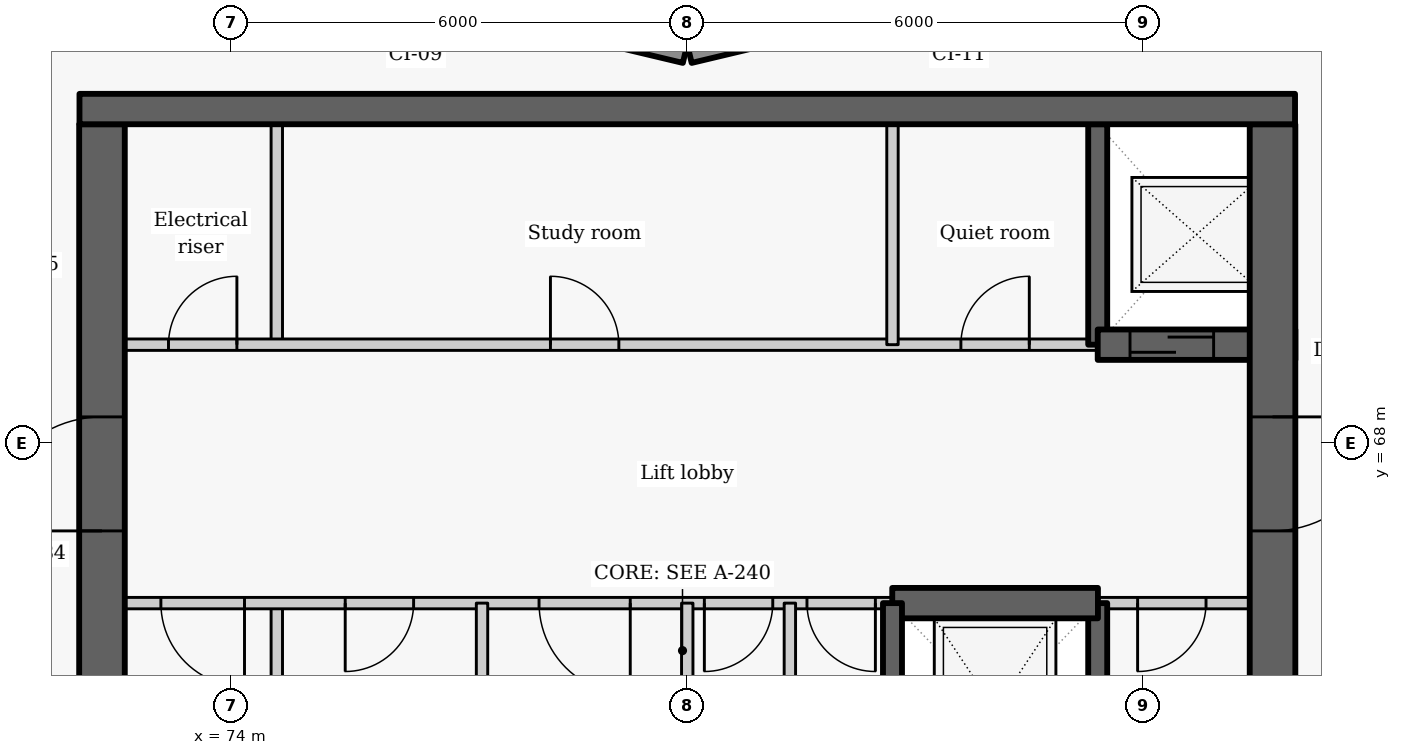
"""IFC4 building model, lengths in metres.
Left out: names, types, materials, properties, quantities, classifications, styles, units other than length and angle.
Written with IfcOpenShell. Run it as: python <this file> out.ifc"""

import sys

from ifc_helpers import new_model, si_unit, direction, frame, frame_2d, origin, place, context, subcontext, project, spatial, rectangle, extrude, element, fill, save


model = new_model("IFC4")
c1 = context("Model", 3, precision=1e-05, world=origin(), true_north=direction((0.0, 1.0)))
c2 = subcontext(c1, "Body", "Model", "MODEL_VIEW")
j1 = project(units=[si_unit("LENGTHUNIT", "METRE"), si_unit("PLANEANGLEUNIT", "RADIAN")], contexts=[c1])
p1 = place(None, origin())
s1 = spatial("IfcSite", under=j1, at=p1, CompositionType="ELEMENT")
p2 = place(p1, origin())
s2 = spatial("IfcBuilding", under=s1, at=p2, CompositionType="ELEMENT")
p3 = place(p2, frame((0.0, 0.0, 229.5)))
s3 = spatial("IfcBuildingStorey", under=s2, at=p3, CompositionType="ELEMENT", Elevation=229.5)
for number, where, z_axis, x_axis in (
    (1, (83.186, 73.881, 0.0), (0.0, 0.0, 1.0), (-0.973, -0.232, 0.0)),
    (2, (79.971, 73.128, 0.0), (0.0, 0.0, 1.0), (-0.973, 0.232, 0.0)),
):
    element("IfcWall", number, at=place(p3, frame(where, z_axis=z_axis, x_axis=x_axis)), inside=s3, PredefinedType="SOLIDWALL", context=c2, shape_type="SweptSolid", body=[
        extrude(rectangle(XDim=3.246, YDim=0.25, at=frame_2d((1.623, 0.0))), origin(), (0.0, 0.0, 1.0), 2.425),
    ])
p4 = place(p3, frame((74.6, 63.1, 0.0), z_axis=(0.0, 0.0, 1.0), x_axis=(0.0, 1.0, 0.0)))
e3 = element("IfcWall", 3, at=p4, inside=s3, PredefinedType="PARTITIONING", context=c2, shape_type="SweptSolid", body=[
    extrude(rectangle(XDim=2.8, YDim=0.15, at=frame_2d((1.4, 0.0))), origin(), (0.0, 0.0, 1.0), 3.025),
])
p5 = place(p3, frame((74.6, 69.3, 0.0), z_axis=(0.0, 0.0, 1.0), x_axis=(0.0, 1.0, 0.0)))
e4 = element("IfcWall", 4, at=p5, inside=s3, PredefinedType="PARTITIONING", context=c2, shape_type="SweptSolid", body=[
    extrude(rectangle(XDim=2.9, YDim=0.15, at=frame_2d((1.45, 0.0))), origin(), (0.0, 0.0, 1.0), 3.025),
])
p6 = place(p3, frame((72.0, 69.3, 0.0), z_axis=(0.0, 0.0, 1.0), x_axis=(1.0, 0.0, 0.0)))
e5 = element("IfcWall", 5, at=p6, inside=s3, PredefinedType="PARTITIONING", context=c2, shape_type="SweptSolid", body=[
    extrude(rectangle(XDim=13.4, YDim=0.15, at=frame_2d((6.7, 0.0))), origin(), (0.0, 0.0, 1.0), 3.025),
])
p7 = place(p6, frame((1.175, 0.0, 0.0)))
e6 = element("IfcOpeningElement", 6, at=p7, cuts=e5, PredefinedType="OPENING", context=c2, shape_type="SweptSolid", body=[
    extrude(rectangle(XDim=0.9, YDim=2.1, at=frame_2d((0.45, 1.05))), frame((0.0, 0.085, 0.0), z_axis=(0.0, -1.0, 0.0), x_axis=(1.0, 0.0, 0.0)), (0.0, 0.0, 1.0), 0.17),
])
p8 = place(p6, frame((6.2, 0.0, 0.0)))
e7 = element("IfcOpeningElement", 7, at=p8, cuts=e5, PredefinedType="OPENING", context=c2, shape_type="SweptSolid", body=[
    extrude(rectangle(XDim=0.9, YDim=2.1, at=frame_2d((0.45, 1.05))), frame((0.0, 0.085, 0.0), z_axis=(0.0, -1.0, 0.0), x_axis=(1.0, 0.0, 0.0)), (0.0, 0.0, 1.0), 0.17),
])
p9 = place(p6, frame((11.6, 0.0, 0.0)))
e8 = element("IfcOpeningElement", 8, at=p9, cuts=e5, PredefinedType="OPENING", context=c2, shape_type="SweptSolid", body=[
    extrude(rectangle(XDim=0.9, YDim=2.1, at=frame_2d((0.45, 1.05))), frame((0.0, 0.085, 0.0), z_axis=(0.0, -1.0, 0.0), x_axis=(1.0, 0.0, 0.0)), (0.0, 0.0, 1.0), 0.17),
])
p10 = place(p3, frame((72.3, 63.1, -0.275), z_axis=(0.0, 0.0, 1.0), x_axis=(0.0, 1.0, 0.0)))
e9 = element("IfcWall", 9, at=p10, inside=s3, PredefinedType="SHEAR", context=c2, shape_type="SweptSolid", body=[
    extrude(rectangle(XDim=9.1, YDim=0.6, at=frame_2d((4.55, 0.0))), origin(), (0.0, 0.0, 1.0), 3.3),
])
p11 = place(p10, frame((3.75, 0.0, 0.275)))
e10 = element("IfcOpeningElement", 10, at=p11, cuts=e9, PredefinedType="OPENING", context=c2, shape_type="SweptSolid", body=[
    extrude(rectangle(XDim=1.5, YDim=2.1, at=frame_2d((0.75, 1.05))), frame((0.0, 0.31, 0.0), z_axis=(0.0, -1.0, 0.0), x_axis=(1.0, 0.0, 0.0)), (0.0, 0.0, 1.0), 0.62),
])
p12 = place(p3, frame((85.4, 63.1, -0.275), z_axis=(0.0, 0.0, 1.0), x_axis=(0.0, 1.0, 0.0)))
e11 = element("IfcWall", 11, at=p12, inside=s3, PredefinedType="SHEAR", context=c2, shape_type="SweptSolid", body=[
    extrude(rectangle(XDim=2.8, YDim=0.25, at=frame_2d((1.4, 0.0))), origin(), (0.0, 0.0, 1.0), 3.3),
])
p13 = place(p3, frame((85.4, 69.3, -0.275), z_axis=(0.0, 0.0, 1.0), x_axis=(0.0, 1.0, 0.0)))
e12 = element("IfcWall", 12, at=p13, inside=s3, PredefinedType="SHEAR", context=c2, shape_type="SweptSolid", body=[
    extrude(rectangle(XDim=2.9, YDim=0.25, at=frame_2d((1.45, 0.0))), origin(), (0.0, 0.0, 1.0), 3.3),
])
p14 = place(p3, frame((85.4, 69.3, -0.275), z_axis=(0.0, 0.0, 1.0), x_axis=(1.0, 0.0, 0.0)))
e13 = element("IfcWall", 13, at=p14, inside=s3, PredefinedType="SHEAR", context=c2, shape_type="SweptSolid", body=[
    extrude(rectangle(XDim=2.6, YDim=0.4, at=frame_2d((1.3, 0.0))), origin(), (0.0, 0.0, 1.0), 3.3),
])
p15 = place(p14, frame((0.425, 0.0, 0.275)))
e14 = element("IfcOpeningElement", 14, at=p15, cuts=e13, PredefinedType="OPENING", context=c2, shape_type="SweptSolid", body=[
    extrude(rectangle(XDim=1.1, YDim=2.1, at=frame_2d((0.55, 1.05))), frame((0.0, 0.21, 0.0), z_axis=(0.0, -1.0, 0.0), x_axis=(1.0, 0.0, 0.0)), (0.0, 0.0, 1.0), 0.42),
])
p16 = place(p3, frame((87.7, 72.2, -0.275), z_axis=(0.0, 0.0, 1.0), x_axis=(0.0, -1.0, 0.0)))
e15 = element("IfcWall", 15, at=p16, inside=s3, PredefinedType="SHEAR", context=c2, shape_type="SweptSolid", body=[
    extrude(rectangle(XDim=14.25, YDim=0.6, at=frame_2d((7.125, 0.0))), origin(), (0.0, 0.0, 1.0), 3.3),
])
p17 = place(p16, frame((3.85, 0.0, 0.275)))
e16 = element("IfcOpeningElement", 16, at=p17, cuts=e15, PredefinedType="OPENING", context=c2, shape_type="SweptSolid", body=[
    extrude(rectangle(XDim=1.5, YDim=2.1, at=frame_2d((0.75, 1.05))), frame((0.0, 0.31, 0.0), z_axis=(0.0, -1.0, 0.0), x_axis=(1.0, 0.0, 0.0)), (0.0, 0.0, 1.0), 0.62),
])
p18 = place(p16, frame((11.125, 0.0, 0.275)))
e17 = element("IfcOpeningElement", 17, at=p18, cuts=e15, PredefinedType="OPENING", context=c2, shape_type="SweptSolid", body=[
    extrude(rectangle(XDim=1.1, YDim=2.1, at=frame_2d((0.55, 1.05))), frame((0.0, 0.31, 0.0), z_axis=(0.0, -1.0, 0.0), x_axis=(1.0, 0.0, 0.0)), (0.0, 0.0, 1.0), 0.62),
])
p19 = place(p3, frame((82.7, 69.3, 0.0), z_axis=(0.0, 0.0, 1.0), x_axis=(0.0, 1.0, 0.0)))
e18 = element("IfcWall", 18, at=p19, inside=s3, PredefinedType="PARTITIONING", context=c2, shape_type="SweptSolid", body=[
    extrude(rectangle(XDim=2.9, YDim=0.15, at=frame_2d((1.45, 0.0))), origin(), (0.0, 0.0, 1.0), 3.025),
])
p20 = place(p3, frame((82.703, 65.9, 0.0), z_axis=(0.0, 0.0, 1.0), x_axis=(-1.0, 0.0, 0.0)))
e19 = element("IfcWall", 19, at=p20, inside=s3, PredefinedType="PARTITIONING", context=c2, shape_type="SweptSolid", body=[
    extrude(rectangle(XDim=10.703, YDim=0.15, at=frame_2d((5.352, 0.0))), origin(), (0.0, 0.0, 1.0), 3.025),
])
p21 = place(p20, frame((8.528, 0.0, 0.0)))
e20 = element("IfcOpeningElement", 20, at=p21, cuts=e19, PredefinedType="OPENING", context=c2, shape_type="SweptSolid", body=[
    extrude(rectangle(XDim=1.1, YDim=2.1, at=frame_2d((0.55, 1.05))), frame((0.0, 0.085, 0.0), z_axis=(0.0, -1.0, 0.0), x_axis=(1.0, 0.0, 0.0)), (0.0, 0.0, 1.0), 0.17),
])
p22 = place(p20, frame((6.303, 0.0, 0.0)))
e21 = element("IfcOpeningElement", 21, at=p22, cuts=e19, PredefinedType="OPENING", context=c2, shape_type="SweptSolid", body=[
    extrude(rectangle(XDim=0.9, YDim=2.1, at=frame_2d((0.45, 1.05))), frame((0.0, 0.085, 0.0), z_axis=(0.0, -1.0, 0.0), x_axis=(1.0, 0.0, 0.0)), (0.0, 0.0, 1.0), 0.17),
])
p23 = place(p20, frame((3.453, 0.0, 0.0)))
e22 = element("IfcOpeningElement", 22, at=p23, cuts=e19, PredefinedType="OPENING", context=c2, shape_type="SweptSolid", body=[
    extrude(rectangle(XDim=1.2, YDim=2.1, at=frame_2d((0.6, 1.05))), frame((0.0, 0.085, 0.0), z_axis=(0.0, -1.0, 0.0), x_axis=(1.0, 0.0, 0.0)), (0.0, 0.0, 1.0), 0.17),
])
p24 = place(p20, frame((1.578, 0.0, 0.0)))
e23 = element("IfcOpeningElement", 23, at=p24, cuts=e19, PredefinedType="OPENING", context=c2, shape_type="SweptSolid", body=[
    extrude(rectangle(XDim=0.9, YDim=2.1, at=frame_2d((0.45, 1.05))), frame((0.0, 0.085, 0.0), z_axis=(0.0, -1.0, 0.0), x_axis=(1.0, 0.0, 0.0)), (0.0, 0.0, 1.0), 0.17),
])
p25 = place(p20, frame((0.228, 0.0, 0.0)))
e24 = element("IfcOpeningElement", 24, at=p25, cuts=e19, PredefinedType="OPENING", context=c2, shape_type="SweptSolid", body=[
    extrude(rectangle(XDim=0.9, YDim=2.1, at=frame_2d((0.45, 1.05))), frame((0.0, 0.085, 0.0), z_axis=(0.0, -1.0, 0.0), x_axis=(1.0, 0.0, 0.0)), (0.0, 0.0, 1.0), 0.17),
])
p26 = place(p3, frame((88.0, 65.9, 0.0), z_axis=(0.0, 0.0, 1.0), x_axis=(-1.0, 0.0, 0.0)))
e25 = element("IfcWall", 25, at=p26, inside=s3, PredefinedType="PARTITIONING", context=c2, shape_type="SweptSolid", body=[
    extrude(rectangle(XDim=2.603, YDim=0.15, at=frame_2d((1.302, 0.0))), origin(), (0.0, 0.0, 1.0), 3.025),
])
p27 = place(p26, frame((1.175, 0.0, 0.0)))
e26 = element("IfcOpeningElement", 26, at=p27, cuts=e25, PredefinedType="OPENING", context=c2, shape_type="SweptSolid", body=[
    extrude(rectangle(XDim=0.9, YDim=2.1, at=frame_2d((0.45, 1.05))), frame((0.0, 0.085, 0.0), z_axis=(0.0, -1.0, 0.0), x_axis=(1.0, 0.0, 0.0)), (0.0, 0.0, 1.0), 0.17),
])
p28 = place(p3, frame((82.697, 65.9, -0.275), z_axis=(0.0, 0.0, 1.0), x_axis=(1.0, 0.0, 0.0)))
e27 = element("IfcWall", 27, at=p28, inside=s3, PredefinedType="SHEAR", context=c2, shape_type="SweptSolid", body=[
    extrude(rectangle(XDim=2.706, YDim=0.4, at=frame_2d((1.353, 0.0))), origin(), (0.0, 0.0, 1.0), 3.3),
])
for number, where, z_axis, x_axis in (
    (28, (77.3, 63.1, 0.0), (0.0, 0.0, 1.0), (0.0, 1.0, 0.0)),
    (29, (80.0, 63.1, 0.0), (0.0, 0.0, 1.0), (0.0, 1.0, 0.0)),
    (30, (81.35, 63.1, 0.0), (0.0, 0.0, 1.0), (0.0, 1.0, 0.0)),
):
    element("IfcWall", number, at=place(p3, frame(where, z_axis=z_axis, x_axis=x_axis)), inside=s3, PredefinedType="PARTITIONING", context=c2, shape_type="SweptSolid", body=[
        extrude(rectangle(XDim=2.8, YDim=0.15, at=frame_2d((1.4, 0.0))), origin(), (0.0, 0.0, 1.0), 3.025),
    ])
p29 = place(p3, frame((82.7, 63.1, -0.275), z_axis=(0.0, 0.0, 1.0), x_axis=(0.0, 1.0, 0.0)))
e31 = element("IfcWall", 31, at=p29, inside=s3, PredefinedType="SHEAR", context=c2, shape_type="SweptSolid", body=[
    extrude(rectangle(XDim=2.8, YDim=0.25, at=frame_2d((1.4, 0.0))), origin(), (0.0, 0.0, 1.0), 3.3),
])
p30 = place(p3, frame((72.004, 72.4, -0.275), z_axis=(0.0, 0.0, 1.0), x_axis=(1.0, 0.0, 0.0)))
e32 = element("IfcWall", 32, at=p30, inside=s3, PredefinedType="SHEAR", context=c2, shape_type="SweptSolid", body=[
    extrude(rectangle(XDim=15.992, YDim=0.4, at=frame_2d((7.996, 0.0))), origin(), (0.0, 0.0, 1.0), 3.3),
])
p31 = place(p7, origin())
e33 = element("IfcDoor", 33, at=p31, inside=s3, OperationType="SINGLE_SWING_RIGHT", PredefinedType="DOOR", context=c2, shape_type="SweptSolid", body=[
    extrude(rectangle(XDim=0.9, YDim=2.1, at=frame_2d((0.45, 1.05))), frame((0.0, 0.025, 0.0), z_axis=(0.0, -1.0, 0.0), x_axis=(1.0, 0.0, 0.0)), (0.0, 0.0, 1.0), 0.05),
])
fill(e6, e33)
p32 = place(p15, origin())
e34 = element("IfcDoor", 34, at=p32, inside=s3, OperationType="SLIDING_TO_LEFT", PredefinedType="DOOR", context=c2, shape_type="SweptSolid", body=[
    extrude(rectangle(XDim=1.1, YDim=2.1, at=frame_2d((0.55, 1.05))), frame((0.0, 0.025, 0.0), z_axis=(0.0, -1.0, 0.0), x_axis=(1.0, 0.0, 0.0)), (0.0, 0.0, 1.0), 0.05),
])
fill(e14, e34)
p33 = place(p8, origin())
e35 = element("IfcDoor", 35, at=p33, inside=s3, OperationType="SINGLE_SWING_LEFT", PredefinedType="DOOR", context=c2, shape_type="SweptSolid", body=[
    extrude(rectangle(XDim=0.9, YDim=2.1, at=frame_2d((0.45, 1.05))), frame((0.0, 0.025, 0.0), z_axis=(0.0, -1.0, 0.0), x_axis=(1.0, 0.0, 0.0)), (0.0, 0.0, 1.0), 0.05),
])
fill(e7, e35)
p34 = place(p9, origin())
e36 = element("IfcDoor", 36, at=p34, inside=s3, OperationType="SINGLE_SWING_RIGHT", PredefinedType="DOOR", context=c2, shape_type="SweptSolid", body=[
    extrude(rectangle(XDim=0.9, YDim=2.1, at=frame_2d((0.45, 1.05))), frame((0.0, 0.025, 0.0), z_axis=(0.0, -1.0, 0.0), x_axis=(1.0, 0.0, 0.0)), (0.0, 0.0, 1.0), 0.05),
])
fill(e8, e36)
p35 = place(p21, origin())
e37 = element("IfcDoor", 37, at=p35, inside=s3, OperationType="SINGLE_SWING_LEFT", PredefinedType="DOOR", context=c2, shape_type="SweptSolid", body=[
    extrude(rectangle(XDim=1.1, YDim=2.1, at=frame_2d((0.55, 1.05))), frame((0.0, 0.025, 0.0), z_axis=(0.0, -1.0, 0.0), x_axis=(1.0, 0.0, 0.0)), (0.0, 0.0, 1.0), 0.05),
])
fill(e20, e37)
p36 = place(p22, origin())
e38 = element("IfcDoor", 38, at=p36, inside=s3, OperationType="SINGLE_SWING_RIGHT", PredefinedType="DOOR", context=c2, shape_type="SweptSolid", body=[
    extrude(rectangle(XDim=0.9, YDim=2.1, at=frame_2d((0.45, 1.05))), frame((0.0, 0.025, 0.0), z_axis=(0.0, -1.0, 0.0), x_axis=(1.0, 0.0, 0.0)), (0.0, 0.0, 1.0), 0.05),
])
fill(e21, e38)
p37 = place(p23, origin())
e39 = element("IfcDoor", 39, at=p37, inside=s3, OperationType="DOUBLE_DOOR_SINGLE_SWING", PredefinedType="DOOR", context=c2, shape_type="SweptSolid", body=[
    extrude(rectangle(XDim=1.2, YDim=2.1, at=frame_2d((0.6, 1.05))), frame((0.0, 0.025, 0.0), z_axis=(0.0, -1.0, 0.0), x_axis=(1.0, 0.0, 0.0)), (0.0, 0.0, 1.0), 0.05),
])
fill(e22, e39)
p38 = place(p24, origin())
e40 = element("IfcDoor", 40, at=p38, inside=s3, OperationType="SINGLE_SWING_RIGHT", PredefinedType="DOOR", context=c2, shape_type="SweptSolid", body=[
    extrude(rectangle(XDim=0.9, YDim=2.1, at=frame_2d((0.45, 1.05))), frame((0.0, 0.025, 0.0), z_axis=(0.0, -1.0, 0.0), x_axis=(1.0, 0.0, 0.0)), (0.0, 0.0, 1.0), 0.05),
])
fill(e23, e40)
p39 = place(p25, origin())
e41 = element("IfcDoor", 41, at=p39, inside=s3, OperationType="SINGLE_SWING_LEFT", PredefinedType="DOOR", context=c2, shape_type="SweptSolid", body=[
    extrude(rectangle(XDim=0.9, YDim=2.1, at=frame_2d((0.45, 1.05))), frame((0.0, 0.025, 0.0), z_axis=(0.0, -1.0, 0.0), x_axis=(1.0, 0.0, 0.0)), (0.0, 0.0, 1.0), 0.05),
])
fill(e24, e41)
p40 = place(p27, origin())
e42 = element("IfcDoor", 42, at=p40, inside=s3, OperationType="SINGLE_SWING_RIGHT", PredefinedType="DOOR", context=c2, shape_type="SweptSolid", body=[
    extrude(rectangle(XDim=0.9, YDim=2.1, at=frame_2d((0.45, 1.05))), frame((0.0, 0.025, 0.0), z_axis=(0.0, -1.0, 0.0), x_axis=(1.0, 0.0, 0.0)), (0.0, 0.0, 1.0), 0.05),
])
fill(e26, e42)
p41 = place(p17, origin())
e43 = element("IfcDoor", 43, at=p41, inside=s3, OperationType="DOUBLE_DOOR_SINGLE_SWING", PredefinedType="DOOR", context=c2, shape_type="SweptSolid", body=[
    extrude(rectangle(XDim=1.5, YDim=2.1, at=frame_2d((0.75, 1.05))), frame((0.0, 0.025, 0.0), z_axis=(0.0, -1.0, 0.0), x_axis=(1.0, 0.0, 0.0)), (0.0, 0.0, 1.0), 0.05),
])
fill(e16, e43)
p42 = place(p11, origin())
e44 = element("IfcDoor", 44, at=p42, inside=s3, OperationType="DOUBLE_DOOR_SINGLE_SWING", PredefinedType="DOOR", context=c2, shape_type="SweptSolid", body=[
    extrude(rectangle(XDim=1.5, YDim=2.1, at=frame_2d((0.75, 1.05))), frame((0.0, 0.025, 0.0), z_axis=(0.0, -1.0, 0.0), x_axis=(1.0, 0.0, 0.0)), (0.0, 0.0, 1.0), 0.05),
])
fill(e10, e44)
save(model, sys.argv[1])
